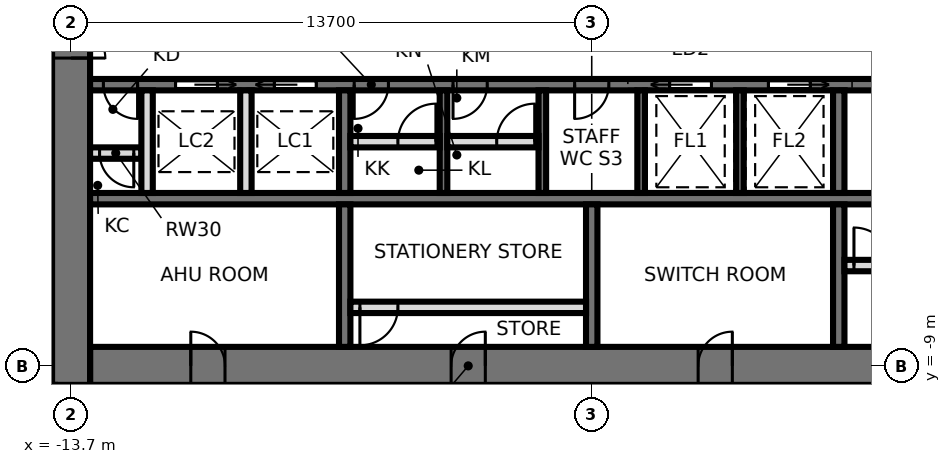
"""IFC4 building model, lengths in metres.
Left out: names, types, materials, properties, quantities, classifications, styles, units other than length and angle.
Written with IfcOpenShell. Run it as: python <this file> out.ifc"""

import sys

from ifc_helpers import new_model, si_unit, direction, frame, frame_2d, origin, place, context, subcontext, project, spatial, rectangle, extrude, element, fill, save


model = new_model("IFC4")
c1 = context("Model", 3, precision=1e-05, world=origin(), true_north=direction((0.0, 1.0)))
c2 = subcontext(c1, "Body", "Model", "MODEL_VIEW")
j1 = project(units=[si_unit("LENGTHUNIT", "METRE"), si_unit("PLANEANGLEUNIT", "RADIAN")], contexts=[c1])
p1 = place(None, origin())
s1 = spatial("IfcSite", under=j1, at=p1, CompositionType="ELEMENT")
p2 = place(p1, origin())
s2 = spatial("IfcBuilding", under=s1, at=p2, CompositionType="ELEMENT")
p3 = place(p2, frame((0.0, 0.0, 207.2)))
s3 = spatial("IfcBuildingStorey", under=s2, at=p3, CompositionType="ELEMENT", Elevation=207.2)
p4 = place(p3, frame((-13.2, -9.0, 0.0), z_axis=(0.0, 0.0, 1.0), x_axis=(1.0, 0.0, 0.0)))
e1 = element("IfcWall", 1, at=p4, inside=s3, PredefinedType="SHEAR", context=c2, shape_type="SweptSolid", body=[
    extrude(rectangle(XDim=26.4, YDim=1.0, at=frame_2d((13.2, 0.0))), origin(), (0.0, 0.0, 1.0), 3.9),
])
p5 = place(p4, frame((2.65, 0.0, 0.0)))
e2 = element("IfcOpeningElement", 2, at=p5, cuts=e1, PredefinedType="OPENING", context=c2, shape_type="SweptSolid", body=[
    extrude(rectangle(XDim=0.9, YDim=2.1, at=frame_2d((0.45, 1.05))), frame((0.0, 0.51, 0.0), z_axis=(0.0, -1.0, 0.0), x_axis=(1.0, 0.0, 0.0)), (0.0, 0.0, 1.0), 1.02),
])
p6 = place(p4, frame((9.5, 0.0, 0.0)))
e3 = element("IfcOpeningElement", 3, at=p6, cuts=e1, PredefinedType="OPENING", context=c2, shape_type="SweptSolid", body=[
    extrude(rectangle(XDim=0.9, YDim=2.1, at=frame_2d((0.45, 1.05))), frame((0.0, 0.51, 0.0), z_axis=(0.0, -1.0, 0.0), x_axis=(1.0, 0.0, 0.0)), (0.0, 0.0, 1.0), 1.02),
])
p7 = place(p4, frame((16.0, 0.0, 0.0)))
e4 = element("IfcOpeningElement", 4, at=p7, cuts=e1, PredefinedType="OPENING", context=c2, shape_type="SweptSolid", body=[
    extrude(rectangle(XDim=0.9, YDim=2.1, at=frame_2d((0.45, 1.05))), frame((0.0, 0.51, 0.0), z_axis=(0.0, -1.0, 0.0), x_axis=(1.0, 0.0, 0.0)), (0.0, 0.0, 1.0), 1.02),
])
p8 = place(p4, frame((22.85, 0.0, 0.0)))
e5 = element("IfcOpeningElement", 5, at=p8, cuts=e1, PredefinedType="OPENING", context=c2, shape_type="SweptSolid", body=[
    extrude(rectangle(XDim=0.9, YDim=2.1, at=frame_2d((0.45, 1.05))), frame((0.0, 0.51, 0.0), z_axis=(0.0, -1.0, 0.0), x_axis=(1.0, 0.0, 0.0)), (0.0, 0.0, 1.0), 1.02),
])
p9 = place(p3, frame((-13.7, 9.5, 0.0), z_axis=(0.0, 0.0, 1.0), x_axis=(0.0, -1.0, 0.0)))
e6 = element("IfcWall", 6, at=p9, inside=s3, PredefinedType="SHEAR", context=c2, shape_type="SweptSolid", body=[
    extrude(rectangle(XDim=19.0, YDim=1.0, at=frame_2d((9.5, 0.0))), origin(), (0.0, 0.0, 1.0), 3.9),
])
p10 = place(p9, frame((8.6, 0.0, 0.0)))
e7 = element("IfcOpeningElement", 7, at=p10, cuts=e6, PredefinedType="OPENING", context=c2, shape_type="SweptSolid", body=[
    extrude(rectangle(XDim=1.8, YDim=2.4, at=frame_2d((0.9, 1.2))), frame((0.0, 0.51, 0.0), z_axis=(0.0, -1.0, 0.0), x_axis=(1.0, 0.0, 0.0)), (0.0, 0.0, 1.0), 1.02),
])
p11 = place(p3, frame((-13.2, -1.6, 0.0), z_axis=(0.0, 0.0, 1.0), x_axis=(1.0, 0.0, 0.0)))
e8 = element("IfcWall", 8, at=p11, inside=s3, PredefinedType="SHEAR", context=c2, shape_type="SweptSolid", body=[
    extrude(rectangle(XDim=26.4, YDim=0.3, at=frame_2d((13.2, 0.0))), origin(), (0.0, 0.0, 1.0), 3.9),
])
p12 = place(p11, frame((25.15, 0.0, 0.0)))
e9 = element("IfcOpeningElement", 9, at=p12, cuts=e8, PredefinedType="OPENING", context=c2, shape_type="SweptSolid", body=[
    extrude(rectangle(XDim=1.0, YDim=2.1, at=frame_2d((0.5, 1.05))), frame((0.0, 0.16, 0.0), z_axis=(0.0, -1.0, 0.0), x_axis=(1.0, 0.0, 0.0)), (0.0, 0.0, 1.0), 0.32),
])
p13 = place(p11, frame((6.95, 0.0, 0.0)))
e10 = element("IfcOpeningElement", 10, at=p13, cuts=e8, PredefinedType="OPENING", context=c2, shape_type="SweptSolid", body=[
    extrude(rectangle(XDim=0.9, YDim=2.1, at=frame_2d((0.45, 1.05))), frame((0.0, 0.16, 0.0), z_axis=(0.0, -1.0, 0.0), x_axis=(1.0, 0.0, 0.0)), (0.0, 0.0, 1.0), 0.32),
])
p14 = place(p11, frame((9.55, 0.0, 0.0)))
e11 = element("IfcOpeningElement", 11, at=p14, cuts=e8, PredefinedType="OPENING", context=c2, shape_type="SweptSolid", body=[
    extrude(rectangle(XDim=0.9, YDim=2.1, at=frame_2d((0.45, 1.05))), frame((0.0, 0.16, 0.0), z_axis=(0.0, -1.0, 0.0), x_axis=(1.0, 0.0, 0.0)), (0.0, 0.0, 1.0), 0.32),
])
p15 = place(p11, frame((12.75, 0.0, 0.0)))
e12 = element("IfcOpeningElement", 12, at=p15, cuts=e8, PredefinedType="OPENING", context=c2, shape_type="SweptSolid", body=[
    extrude(rectangle(XDim=0.9, YDim=2.1, at=frame_2d((0.45, 1.05))), frame((0.0, 0.16, 0.0), z_axis=(0.0, -1.0, 0.0), x_axis=(1.0, 0.0, 0.0)), (0.0, 0.0, 1.0), 0.32),
])
p16 = place(p11, frame((15.25, 0.0, 0.0)))
e13 = element("IfcOpeningElement", 13, at=p16, cuts=e8, PredefinedType="OPENING", context=c2, shape_type="SweptSolid", body=[
    extrude(rectangle(XDim=1.1, YDim=2.3, at=frame_2d((0.55, 1.15))), frame((0.0, 0.16, 0.0), z_axis=(0.0, -1.0, 0.0), x_axis=(1.0, 0.0, 0.0)), (0.0, 0.0, 1.0), 0.32),
])
p17 = place(p11, frame((17.85, 0.0, 0.0)))
e14 = element("IfcOpeningElement", 14, at=p17, cuts=e8, PredefinedType="OPENING", context=c2, shape_type="SweptSolid", body=[
    extrude(rectangle(XDim=1.1, YDim=2.3, at=frame_2d((0.55, 1.15))), frame((0.0, 0.16, 0.0), z_axis=(0.0, -1.0, 0.0), x_axis=(1.0, 0.0, 0.0)), (0.0, 0.0, 1.0), 0.32),
])
p18 = place(p11, frame((4.85, 0.0, 0.0)))
e15 = element("IfcOpeningElement", 15, at=p18, cuts=e8, PredefinedType="OPENING", context=c2, shape_type="SweptSolid", body=[
    extrude(rectangle(XDim=1.1, YDim=2.3, at=frame_2d((0.55, 1.15))), frame((0.0, 0.16, 0.0), z_axis=(0.0, -1.0, 0.0), x_axis=(1.0, 0.0, 0.0)), (0.0, 0.0, 1.0), 0.32),
])
p19 = place(p11, frame((2.25, 0.0, 0.0)))
e16 = element("IfcOpeningElement", 16, at=p19, cuts=e8, PredefinedType="OPENING", context=c2, shape_type="SweptSolid", body=[
    extrude(rectangle(XDim=1.1, YDim=2.3, at=frame_2d((0.55, 1.15))), frame((0.0, 0.16, 0.0), z_axis=(0.0, -1.0, 0.0), x_axis=(1.0, 0.0, 0.0)), (0.0, 0.0, 1.0), 0.32),
])
p20 = place(p11, frame((0.35, 0.0, 0.0)))
e17 = element("IfcOpeningElement", 17, at=p20, cuts=e8, PredefinedType="OPENING", context=c2, shape_type="SweptSolid", body=[
    extrude(rectangle(XDim=0.9, YDim=2.1, at=frame_2d((0.45, 1.05))), frame((0.0, 0.16, 0.0), z_axis=(0.0, -1.0, 0.0), x_axis=(1.0, 0.0, 0.0)), (0.0, 0.0, 1.0), 0.32),
])
p21 = place(p3, frame((-13.2, -4.6, 0.0), z_axis=(0.0, 0.0, 1.0), x_axis=(1.0, 0.0, 0.0)))
e18 = element("IfcWall", 18, at=p21, inside=s3, PredefinedType="SHEAR", context=c2, shape_type="SweptSolid", body=[
    extrude(rectangle(XDim=26.4, YDim=0.3, at=frame_2d((13.2, 0.0))), origin(), (0.0, 0.0, 1.0), 3.9),
])
p22 = place(p3, frame((-6.5, -1.75, 0.0), z_axis=(0.0, 0.0, 1.0), x_axis=(0.0, -1.0, 0.0)))
e19 = element("IfcWall", 19, at=p22, inside=s3, PredefinedType="SHEAR", context=c2, shape_type="SweptSolid", body=[
    extrude(rectangle(XDim=2.7, YDim=0.3, at=frame_2d((1.35, 0.0))), origin(), (0.0, 0.0, 1.0), 3.9),
])
p23 = place(p3, frame((-6.5, -4.75, 0.0), z_axis=(0.0, 0.0, 1.0), x_axis=(0.0, -1.0, 0.0)))
e20 = element("IfcWall", 20, at=p23, inside=s3, PredefinedType="SHEAR", context=c2, shape_type="SweptSolid", body=[
    extrude(rectangle(XDim=3.75, YDim=0.3, at=frame_2d((1.875, 0.0))), origin(), (0.0, 0.0, 1.0), 3.9),
])
p24 = place(p3, frame((6.5, -1.75, 0.0), z_axis=(0.0, 0.0, 1.0), x_axis=(0.0, -1.0, 0.0)))
e21 = element("IfcWall", 21, at=p24, inside=s3, PredefinedType="SHEAR", context=c2, shape_type="SweptSolid", body=[
    extrude(rectangle(XDim=2.7, YDim=0.3, at=frame_2d((1.35, 0.0))), origin(), (0.0, 0.0, 1.0), 3.9),
])
p25 = place(p3, frame((6.5, -4.75, 0.0), z_axis=(0.0, 0.0, 1.0), x_axis=(0.0, -1.0, 0.0)))
e22 = element("IfcWall", 22, at=p25, inside=s3, PredefinedType="SHEAR", context=c2, shape_type="SweptSolid", body=[
    extrude(rectangle(XDim=3.75, YDim=0.3, at=frame_2d((1.875, 0.0))), origin(), (0.0, 0.0, 1.0), 3.9),
])
for number, where, z_axis, x_axis in (
    (23, (-3.9, -1.75, 0.0), (0.0, 0.0, 1.0), (0.0, -1.0, 0.0)),
    (24, (-1.3, -1.75, 0.0), (0.0, 0.0, 1.0), (0.0, -1.0, 0.0)),
    (25, (1.3, -1.75, 0.0), (0.0, 0.0, 1.0), (0.0, -1.0, 0.0)),
    (26, (3.9, -1.75, 0.0), (0.0, 0.0, 1.0), (0.0, -1.0, 0.0)),
):
    element("IfcWall", number, at=place(p3, frame(where, z_axis=z_axis, x_axis=x_axis)), inside=s3, PredefinedType="SHEAR", context=c2, shape_type="SweptSolid", body=[
        extrude(rectangle(XDim=2.7, YDim=0.2, at=frame_2d((1.35, 0.0))), origin(), (0.0, 0.0, 1.0), 3.9),
    ])
p26 = place(p3, frame((0.0, -4.75, 0.0), z_axis=(0.0, 0.0, 1.0), x_axis=(0.0, -1.0, 0.0)))
e27 = element("IfcWall", 27, at=p26, inside=s3, PredefinedType="SHEAR", context=c2, shape_type="SweptSolid", body=[
    extrude(rectangle(XDim=3.75, YDim=0.3, at=frame_2d((1.875, 0.0))), origin(), (0.0, 0.0, 1.0), 3.9),
])
p27 = place(p3, frame((-6.35, -3.1, 0.0), z_axis=(0.0, 0.0, 1.0), x_axis=(1.0, 0.0, 0.0)))
e28 = element("IfcWall", 28, at=p27, inside=s3, PredefinedType="PARTITIONING", context=c2, shape_type="SweptSolid", body=[
    extrude(rectangle(XDim=2.35, YDim=0.3, at=frame_2d((1.175, 0.0))), origin(), (0.0, 0.0, 1.0), 3.74),
])
p28 = place(p27, frame((1.25, 0.0, 0.0)))
e29 = element("IfcOpeningElement", 29, at=p28, cuts=e28, PredefinedType="OPENING", context=c2, shape_type="SweptSolid", body=[
    extrude(rectangle(XDim=1.0, YDim=2.4, at=frame_2d((0.5, 1.2))), frame((0.0, 0.16, 0.0), z_axis=(0.0, -1.0, 0.0), x_axis=(1.0, 0.0, 0.0)), (0.0, 0.0, 1.0), 0.32),
])
p29 = place(p3, frame((-3.8, -3.1, 0.0), z_axis=(0.0, 0.0, 1.0), x_axis=(1.0, 0.0, 0.0)))
e30 = element("IfcWall", 30, at=p29, inside=s3, PredefinedType="PARTITIONING", context=c2, shape_type="SweptSolid", body=[
    extrude(rectangle(XDim=2.4, YDim=0.3, at=frame_2d((1.2, 0.0))), origin(), (0.0, 0.0, 1.0), 3.74),
])
p30 = place(p29, frame((1.3, 0.0, 0.0)))
e31 = element("IfcOpeningElement", 31, at=p30, cuts=e30, PredefinedType="OPENING", context=c2, shape_type="SweptSolid", body=[
    extrude(rectangle(XDim=1.0, YDim=2.4, at=frame_2d((0.5, 1.2))), frame((0.0, 0.16, 0.0), z_axis=(0.0, -1.0, 0.0), x_axis=(1.0, 0.0, 0.0)), (0.0, 0.0, 1.0), 0.32),
])
p31 = place(p3, frame((-6.35, -7.46, 0.0), z_axis=(0.0, 0.0, 1.0), x_axis=(1.0, 0.0, 0.0)))
e32 = element("IfcWall", 32, at=p31, inside=s3, PredefinedType="PARTITIONING", context=c2, shape_type="SweptSolid", body=[
    extrude(rectangle(XDim=6.2, YDim=0.3, at=frame_2d((3.1, 0.0))), origin(), (0.0, 0.0, 1.0), 3.74),
])
p32 = place(p31, frame((0.25, 0.0, 0.0)))
e33 = element("IfcOpeningElement", 33, at=p32, cuts=e32, PredefinedType="OPENING", context=c2, shape_type="SweptSolid", body=[
    extrude(rectangle(XDim=1.0, YDim=2.4, at=frame_2d((0.5, 1.2))), frame((0.0, 0.16, 0.0), z_axis=(0.0, -1.0, 0.0), x_axis=(1.0, 0.0, 0.0)), (0.0, 0.0, 1.0), 0.32),
])
p33 = place(p3, frame((6.65, -6.36, 0.0), z_axis=(0.0, 0.0, 1.0), x_axis=(1.0, 0.0, 0.0)))
e34 = element("IfcWall", 34, at=p33, inside=s3, PredefinedType="PARTITIONING", context=c2, shape_type="SweptSolid", body=[
    extrude(rectangle(XDim=6.55, YDim=0.3, at=frame_2d((3.275, 0.0))), origin(), (0.0, 0.0, 1.0), 3.74),
])
p34 = place(p33, frame((0.25, 0.0, 0.0)))
e35 = element("IfcOpeningElement", 35, at=p34, cuts=e34, PredefinedType="OPENING", context=c2, shape_type="SweptSolid", body=[
    extrude(rectangle(XDim=1.0, YDim=2.4, at=frame_2d((0.5, 1.2))), frame((0.0, 0.16, 0.0), z_axis=(0.0, -1.0, 0.0), x_axis=(1.0, 0.0, 0.0)), (0.0, 0.0, 1.0), 0.32),
])
p35 = place(p3, frame((-13.2, -3.4, 0.0), z_axis=(0.0, 0.0, 1.0), x_axis=(1.0, 0.0, 0.0)))
e36 = element("IfcWall", 36, at=p35, inside=s3, PredefinedType="SOLIDWALL", context=c2, shape_type="SweptSolid", body=[
    extrude(rectangle(XDim=1.35, YDim=0.3, at=frame_2d((0.675, 0.0))), origin(), (0.0, 0.0, 1.0), 3.74),
])
p36 = place(p35, frame((0.25, 0.0, 0.0)))
e37 = element("IfcOpeningElement", 37, at=p36, cuts=e36, PredefinedType="OPENING", context=c2, shape_type="SweptSolid", body=[
    extrude(rectangle(XDim=0.9, YDim=2.1, at=frame_2d((0.45, 1.05))), frame((0.0, 0.16, 0.0), z_axis=(0.0, -1.0, 0.0), x_axis=(1.0, 0.0, 0.0)), (0.0, 0.0, 1.0), 0.32),
])
for number, where, z_axis, x_axis in (
    (38, (-9.1, -1.75, 0.0), (0.0, 0.0, 1.0), (0.0, -1.0, 0.0)),
    (39, (-11.7, -1.75, 0.0), (0.0, 0.0, 1.0), (0.0, -1.0, 0.0)),
):
    element("IfcWall", number, at=place(p3, frame(where, z_axis=z_axis, x_axis=x_axis)), inside=s3, PredefinedType="SOLIDWALL", context=c2, shape_type="SweptSolid", body=[
        extrude(rectangle(XDim=2.7, YDim=0.3, at=frame_2d((1.35, 0.0))), origin(), (0.0, 0.0, 1.0), 3.74),
    ])
p37 = place(p3, frame((-14.2, -9.5, 0.0), z_axis=(0.0, 0.0, 1.0), x_axis=(0.0, -1.0, 0.0)))
e40 = element("IfcWall", 40, at=p37, inside=s3, PredefinedType="PARTITIONING", context=c2, shape_type="SweptSolid", body=[
    extrude(rectangle(XDim=1.8, YDim=0.15, at=frame_2d((0.9, 0.0))), origin(), (0.0, 0.0, 1.0), 3.74),
])
p38 = place(p10, origin())
e41 = element("IfcDoor", 41, at=p38, inside=s3, OperationType="DOUBLE_DOOR_SINGLE_SWING", PredefinedType="DOOR", context=c2, shape_type="SweptSolid", body=[
    extrude(rectangle(XDim=1.72, YDim=2.36, at=frame_2d((0.9, 1.18))), frame((0.0, 0.025, 0.0), z_axis=(0.0, -1.0, 0.0), x_axis=(1.0, 0.0, 0.0)), (0.0, 0.0, 1.0), 0.05),
    extrude(rectangle(XDim=0.04, YDim=2.4, at=frame_2d((0.02, 1.2))), frame((0.0, 0.25, 0.0), z_axis=(0.0, -1.0, 0.0), x_axis=(1.0, 0.0, 0.0)), (0.0, 0.0, 1.0), 0.5),
    extrude(rectangle(XDim=0.04, YDim=2.4, at=frame_2d((1.78, 1.2))), frame((0.0, 0.25, 0.0), z_axis=(0.0, -1.0, 0.0), x_axis=(1.0, 0.0, 0.0)), (0.0, 0.0, 1.0), 0.5),
    extrude(rectangle(XDim=1.72, YDim=0.04, at=frame_2d((0.9, 2.38))), frame((0.0, 0.25, 0.0), z_axis=(0.0, -1.0, 0.0), x_axis=(1.0, 0.0, 0.0)), (0.0, 0.0, 1.0), 0.5),
])
fill(e7, e41)
p39 = place(p28, origin())
e42 = element("IfcDoor", 42, at=p39, inside=s3, OperationType="SINGLE_SWING_RIGHT", PredefinedType="DOOR", context=c2, shape_type="SweptSolid", body=[
    extrude(rectangle(XDim=1.0, YDim=2.4, at=frame_2d((0.5, 1.2))), frame((0.0, 0.025, 0.0), z_axis=(0.0, -1.0, 0.0), x_axis=(1.0, 0.0, 0.0)), (0.0, 0.0, 1.0), 0.05),
])
fill(e29, e42)
p40 = place(p13, frame((0.9, 0.0, 0.0), z_axis=(0.0, 0.0, 1.0), x_axis=(-1.0, 0.0, 0.0)))
e43 = element("IfcDoor", 43, at=p40, inside=s3, OperationType="SINGLE_SWING_RIGHT", PredefinedType="DOOR", context=c2, shape_type="SweptSolid", body=[
    extrude(rectangle(XDim=0.9, YDim=2.1, at=frame_2d((0.45, 1.05))), frame((0.0, 0.025, 0.0), z_axis=(0.0, -1.0, 0.0), x_axis=(1.0, 0.0, 0.0)), (0.0, 0.0, 1.0), 0.05),
])
fill(e10, e43)
p41 = place(p30, origin())
e44 = element("IfcDoor", 44, at=p41, inside=s3, OperationType="SINGLE_SWING_RIGHT", PredefinedType="DOOR", context=c2, shape_type="SweptSolid", body=[
    extrude(rectangle(XDim=1.0, YDim=2.4, at=frame_2d((0.5, 1.2))), frame((0.0, 0.025, 0.0), z_axis=(0.0, -1.0, 0.0), x_axis=(1.0, 0.0, 0.0)), (0.0, 0.0, 1.0), 0.05),
])
fill(e31, e44)
p42 = place(p14, frame((0.9, 0.0, 0.0), z_axis=(0.0, 0.0, 1.0), x_axis=(-1.0, 0.0, 0.0)))
e45 = element("IfcDoor", 45, at=p42, inside=s3, OperationType="SINGLE_SWING_RIGHT", PredefinedType="DOOR", context=c2, shape_type="SweptSolid", body=[
    extrude(rectangle(XDim=0.9, YDim=2.1, at=frame_2d((0.45, 1.05))), frame((0.0, 0.025, 0.0), z_axis=(0.0, -1.0, 0.0), x_axis=(1.0, 0.0, 0.0)), (0.0, 0.0, 1.0), 0.05),
])
fill(e11, e45)
p43 = place(p15, frame((0.9, 0.0, 0.0), z_axis=(0.0, 0.0, 1.0), x_axis=(-1.0, 0.0, 0.0)))
e46 = element("IfcDoor", 46, at=p43, inside=s3, OperationType="SINGLE_SWING_RIGHT", PredefinedType="DOOR", context=c2, shape_type="SweptSolid", body=[
    extrude(rectangle(XDim=0.9, YDim=2.1, at=frame_2d((0.45, 1.05))), frame((0.0, 0.025, 0.0), z_axis=(0.0, -1.0, 0.0), x_axis=(1.0, 0.0, 0.0)), (0.0, 0.0, 1.0), 0.05),
])
fill(e12, e46)
p44 = place(p16, frame((1.1, 0.0, 0.0), z_axis=(0.0, 0.0, 1.0), x_axis=(-1.0, 0.0, 0.0)))
e47 = element("IfcDoor", 47, at=p44, inside=s3, OperationType="SLIDING_TO_RIGHT", PredefinedType="DOOR", context=c2, shape_type="SweptSolid", body=[
    extrude(rectangle(XDim=1.1, YDim=2.3, at=frame_2d((0.55, 1.15))), frame((0.0, 0.025, 0.0), z_axis=(0.0, -1.0, 0.0), x_axis=(1.0, 0.0, 0.0)), (0.0, 0.0, 1.0), 0.05),
])
fill(e13, e47)
p45 = place(p17, frame((1.1, 0.0, 0.0), z_axis=(0.0, 0.0, 1.0), x_axis=(-1.0, 0.0, 0.0)))
e48 = element("IfcDoor", 48, at=p45, inside=s3, OperationType="SLIDING_TO_LEFT", PredefinedType="DOOR", context=c2, shape_type="SweptSolid", body=[
    extrude(rectangle(XDim=1.1, YDim=2.3, at=frame_2d((0.55, 1.15))), frame((0.0, 0.025, 0.0), z_axis=(0.0, -1.0, 0.0), x_axis=(1.0, 0.0, 0.0)), (0.0, 0.0, 1.0), 0.05),
])
fill(e14, e48)
p46 = place(p18, frame((1.1, 0.0, 0.0), z_axis=(0.0, 0.0, 1.0), x_axis=(-1.0, 0.0, 0.0)))
e49 = element("IfcDoor", 49, at=p46, inside=s3, OperationType="SLIDING_TO_RIGHT", PredefinedType="DOOR", context=c2, shape_type="SweptSolid", body=[
    extrude(rectangle(XDim=1.1, YDim=2.3, at=frame_2d((0.55, 1.15))), frame((0.0, 0.025, 0.0), z_axis=(0.0, -1.0, 0.0), x_axis=(1.0, 0.0, 0.0)), (0.0, 0.0, 1.0), 0.05),
])
fill(e15, e49)
p47 = place(p19, frame((1.1, 0.0, 0.0), z_axis=(0.0, 0.0, 1.0), x_axis=(-1.0, 0.0, 0.0)))
e50 = element("IfcDoor", 50, at=p47, inside=s3, OperationType="SLIDING_TO_LEFT", PredefinedType="DOOR", context=c2, shape_type="SweptSolid", body=[
    extrude(rectangle(XDim=1.1, YDim=2.3, at=frame_2d((0.55, 1.15))), frame((0.0, 0.025, 0.0), z_axis=(0.0, -1.0, 0.0), x_axis=(1.0, 0.0, 0.0)), (0.0, 0.0, 1.0), 0.05),
])
fill(e16, e50)
p48 = place(p20, frame((0.9, 0.0, 0.0), z_axis=(0.0, 0.0, 1.0), x_axis=(-1.0, 0.0, 0.0)))
e51 = element("IfcDoor", 51, at=p48, inside=s3, OperationType="SINGLE_SWING_LEFT", PredefinedType="DOOR", context=c2, shape_type="SweptSolid", body=[
    extrude(rectangle(XDim=0.9, YDim=2.1, at=frame_2d((0.45, 1.05))), frame((0.0, 0.025, 0.0), z_axis=(0.0, -1.0, 0.0), x_axis=(1.0, 0.0, 0.0)), (0.0, 0.0, 1.0), 0.05),
])
fill(e17, e51)
p49 = place(p5, origin())
e52 = element("IfcDoor", 52, at=p49, inside=s3, OperationType="SINGLE_SWING_LEFT", PredefinedType="DOOR", context=c2, shape_type="SweptSolid", body=[
    extrude(rectangle(XDim=0.82, YDim=2.06, at=frame_2d((0.45, 1.03))), frame((0.0, 0.025, 0.0), z_axis=(0.0, -1.0, 0.0), x_axis=(1.0, 0.0, 0.0)), (0.0, 0.0, 1.0), 0.05),
    extrude(rectangle(XDim=0.04, YDim=2.1, at=frame_2d((0.02, 1.05))), frame((0.0, 0.25, 0.0), z_axis=(0.0, -1.0, 0.0), x_axis=(1.0, 0.0, 0.0)), (0.0, 0.0, 1.0), 0.5),
    extrude(rectangle(XDim=0.04, YDim=2.1, at=frame_2d((0.88, 1.05))), frame((0.0, 0.25, 0.0), z_axis=(0.0, -1.0, 0.0), x_axis=(1.0, 0.0, 0.0)), (0.0, 0.0, 1.0), 0.5),
    extrude(rectangle(XDim=0.82, YDim=0.04, at=frame_2d((0.45, 2.08))), frame((0.0, 0.25, 0.0), z_axis=(0.0, -1.0, 0.0), x_axis=(1.0, 0.0, 0.0)), (0.0, 0.0, 1.0), 0.5),
])
fill(e2, e52)
p50 = place(p6, origin())
e53 = element("IfcDoor", 53, at=p50, inside=s3, OperationType="SINGLE_SWING_RIGHT", PredefinedType="DOOR", context=c2, shape_type="SweptSolid", body=[
    extrude(rectangle(XDim=0.82, YDim=2.06, at=frame_2d((0.45, 1.03))), frame((0.0, 0.025, 0.0), z_axis=(0.0, -1.0, 0.0), x_axis=(1.0, 0.0, 0.0)), (0.0, 0.0, 1.0), 0.05),
    extrude(rectangle(XDim=0.04, YDim=2.1, at=frame_2d((0.02, 1.05))), frame((0.0, 0.25, 0.0), z_axis=(0.0, -1.0, 0.0), x_axis=(1.0, 0.0, 0.0)), (0.0, 0.0, 1.0), 0.5),
    extrude(rectangle(XDim=0.04, YDim=2.1, at=frame_2d((0.88, 1.05))), frame((0.0, 0.25, 0.0), z_axis=(0.0, -1.0, 0.0), x_axis=(1.0, 0.0, 0.0)), (0.0, 0.0, 1.0), 0.5),
    extrude(rectangle(XDim=0.82, YDim=0.04, at=frame_2d((0.45, 2.08))), frame((0.0, 0.25, 0.0), z_axis=(0.0, -1.0, 0.0), x_axis=(1.0, 0.0, 0.0)), (0.0, 0.0, 1.0), 0.5),
])
fill(e3, e53)
p51 = place(p7, origin())
e54 = element("IfcDoor", 54, at=p51, inside=s3, OperationType="SINGLE_SWING_RIGHT", PredefinedType="DOOR", context=c2, shape_type="SweptSolid", body=[
    extrude(rectangle(XDim=0.82, YDim=2.06, at=frame_2d((0.45, 1.03))), frame((0.0, 0.025, 0.0), z_axis=(0.0, -1.0, 0.0), x_axis=(1.0, 0.0, 0.0)), (0.0, 0.0, 1.0), 0.05),
    extrude(rectangle(XDim=0.04, YDim=2.1, at=frame_2d((0.02, 1.05))), frame((0.0, 0.25, 0.0), z_axis=(0.0, -1.0, 0.0), x_axis=(1.0, 0.0, 0.0)), (0.0, 0.0, 1.0), 0.5),
    extrude(rectangle(XDim=0.04, YDim=2.1, at=frame_2d((0.88, 1.05))), frame((0.0, 0.25, 0.0), z_axis=(0.0, -1.0, 0.0), x_axis=(1.0, 0.0, 0.0)), (0.0, 0.0, 1.0), 0.5),
    extrude(rectangle(XDim=0.82, YDim=0.04, at=frame_2d((0.45, 2.08))), frame((0.0, 0.25, 0.0), z_axis=(0.0, -1.0, 0.0), x_axis=(1.0, 0.0, 0.0)), (0.0, 0.0, 1.0), 0.5),
])
fill(e4, e54)
p52 = place(p32, frame((1.0, 0.0, 0.0), z_axis=(0.0, 0.0, 1.0), x_axis=(-1.0, 0.0, 0.0)))
e55 = element("IfcDoor", 55, at=p52, inside=s3, OperationType="SINGLE_SWING_RIGHT", PredefinedType="DOOR", context=c2, shape_type="SweptSolid", body=[
    extrude(rectangle(XDim=1.0, YDim=2.4, at=frame_2d((0.5, 1.2))), frame((0.0, 0.025, 0.0), z_axis=(0.0, -1.0, 0.0), x_axis=(1.0, 0.0, 0.0)), (0.0, 0.0, 1.0), 0.05),
])
fill(e33, e55)
p53 = place(p34, origin())
e56 = element("IfcDoor", 56, at=p53, inside=s3, OperationType="SINGLE_SWING_LEFT", PredefinedType="DOOR", context=c2, shape_type="SweptSolid", body=[
    extrude(rectangle(XDim=1.0, YDim=2.4, at=frame_2d((0.5, 1.2))), frame((0.0, 0.025, 0.0), z_axis=(0.0, -1.0, 0.0), x_axis=(1.0, 0.0, 0.0)), (0.0, 0.0, 1.0), 0.05),
])
fill(e35, e56)
p54 = place(p36, frame((0.9, 0.0, 0.0), z_axis=(0.0, 0.0, 1.0), x_axis=(-1.0, 0.0, 0.0)))
e57 = element("IfcDoor", 57, at=p54, inside=s3, OperationType="SINGLE_SWING_LEFT", PredefinedType="DOOR", context=c2, shape_type="SweptSolid", body=[
    extrude(rectangle(XDim=0.9, YDim=2.1, at=frame_2d((0.45, 1.05))), frame((0.0, 0.025, 0.0), z_axis=(0.0, -1.0, 0.0), x_axis=(1.0, 0.0, 0.0)), (0.0, 0.0, 1.0), 0.05),
])
fill(e37, e57)
save(model, sys.argv[1])
